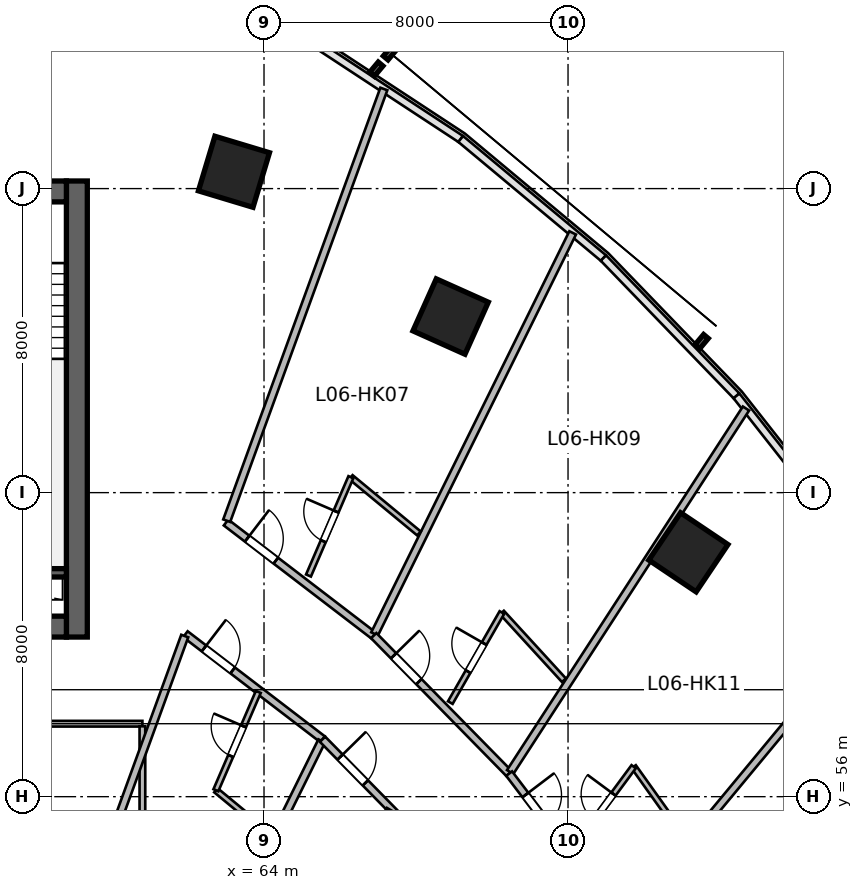
"""IFC4 building model, lengths in metres.
Left out: names, types, materials, properties, quantities, classifications, styles, units other than length and angle.
Written with IfcOpenShell. Run it as: python <this file> out.ifc"""

import sys

from ifc_helpers import new_model, si_unit, direction, frame, frame_2d, origin, origin_2d, place, context, subcontext, project, spatial, rectangle, extrude, source, transform, mapped, element, fill, save


model = new_model("IFC4")
c1 = context("Model", 3, precision=1e-05, world=origin(), true_north=direction((0.0, 1.0)))
c2 = subcontext(c1, "Body", "Model", "MODEL_VIEW")
j1 = project(units=[si_unit("LENGTHUNIT", "METRE"), si_unit("PLANEANGLEUNIT", "RADIAN")], contexts=[c1])
p1 = place(None, origin())
s1 = spatial("IfcSite", under=j1, at=p1, CompositionType="ELEMENT")
p2 = place(p1, origin())
s2 = spatial("IfcBuilding", under=s1, at=p2, CompositionType="ELEMENT")
p3 = place(p2, frame((0.0, 0.0, 35.4)))
s3 = spatial("IfcBuildingStorey", under=s2, at=p3, CompositionType="ELEMENT", Elevation=35.4)
m1 = source(origin(), c2, "Body", "SweptSolid", [
    extrude(rectangle(XDim=12.0, YDim=0.55, at=frame_2d((6.0, 0.0))), origin(), (0.0, 0.0, 1.0), 3.6),
])
p4 = place(p3, frame((59.075, 60.2, 0.0), z_axis=(0.0, 0.0, 1.0), x_axis=(0.0, 1.0, 0.0)))
e1 = element("IfcWall", 1, at=p4, inside=s3, PredefinedType="SHEAR", context=c2, shape_type="MappedRepresentation", body=[
    mapped(m1, transform((0.0, 0.0, 0.0), scale=1.0)),
])
m2 = source(origin(), c2, "Body", "SweptSolid", [
    extrude(rectangle(XDim=21.6, YDim=0.55, at=frame_2d((10.8, 0.0))), origin(), (0.0, 0.0, 1.0), 3.6),
])
p5 = place(p3, frame((37.2, 60.475, 0.0), z_axis=(0.0, 0.0, 1.0), x_axis=(1.0, 0.0, 0.0)))
e2 = element("IfcWall", 2, at=p5, inside=s3, PredefinedType="SHEAR", context=c2, shape_type="MappedRepresentation", body=[
    mapped(m2, transform((0.0, 0.0, 0.0), scale=1.0)),
])
p6 = place(p5, frame((1.1, 0.0, 0.0)))
e3 = element("IfcOpeningElement", 3, at=p6, cuts=e2, PredefinedType="OPENING", context=c2, shape_type="SweptSolid", body=[
    extrude(rectangle(XDim=1.15, YDim=2.15, at=frame_2d((0.575, 1.075))), frame((0.0, 0.285, 0.0), z_axis=(0.0, -1.0, 0.0), x_axis=(1.0, 0.0, 0.0)), (0.0, 0.0, 1.0), 0.57),
])
p7 = place(p5, frame((19.5, 0.0, 0.0)))
e4 = element("IfcOpeningElement", 4, at=p7, cuts=e2, PredefinedType="OPENING", context=c2, shape_type="SweptSolid", body=[
    extrude(rectangle(XDim=0.9, YDim=2.1, at=frame_2d((0.45, 1.05))), frame((0.0, 0.285, 0.0), z_axis=(0.0, -1.0, 0.0), x_axis=(1.0, 0.0, 0.0)), (0.0, 0.0, 1.0), 0.57),
])
p8 = place(p5, frame((12.02, 0.0, 0.0)))
e5 = element("IfcOpeningElement", 5, at=p8, cuts=e2, PredefinedType="OPENING", context=c2, shape_type="SweptSolid", body=[
    extrude(rectangle(XDim=1.6, YDim=2.15, at=frame_2d((0.8, 1.075))), frame((0.0, 0.285, 0.0), z_axis=(0.0, -1.0, 0.0), x_axis=(1.0, 0.0, 0.0)), (0.0, 0.0, 1.0), 0.57),
])
p9 = place(p3, frame((37.2, 71.925, 0.0), z_axis=(0.0, 0.0, 1.0), x_axis=(1.0, 0.0, 0.0)))
e6 = element("IfcWall", 6, at=p9, inside=s3, PredefinedType="SHEAR", context=c2, shape_type="MappedRepresentation", body=[
    mapped(m2, transform((0.0, 0.0, 0.0), scale=1.0)),
])
p10 = place(p9, frame((1.2, 0.0, 0.0)))
e7 = element("IfcOpeningElement", 7, at=p10, cuts=e6, PredefinedType="OPENING", context=c2, shape_type="SweptSolid", body=[
    extrude(rectangle(XDim=0.9, YDim=2.1, at=frame_2d((0.45, 1.05))), frame((0.0, 0.285, 0.0), z_axis=(0.0, -1.0, 0.0), x_axis=(1.0, 0.0, 0.0)), (0.0, 0.0, 1.0), 0.57),
])
p11 = place(p9, frame((14.7, 0.0, 0.0)))
e8 = element("IfcOpeningElement", 8, at=p11, cuts=e6, PredefinedType="OPENING", context=c2, shape_type="SweptSolid", body=[
    extrude(rectangle(XDim=1.2, YDim=2.15, at=frame_2d((0.6, 1.075))), frame((0.0, 0.285, 0.0), z_axis=(0.0, -1.0, 0.0), x_axis=(1.0, 0.0, 0.0)), (0.0, 0.0, 1.0), 0.57),
])
p12 = place(p9, frame((4.15, 0.0, 0.0)))
e9 = element("IfcOpeningElement", 9, at=p12, cuts=e6, PredefinedType="OPENING", context=c2, shape_type="SweptSolid", body=[
    extrude(rectangle(XDim=1.3, YDim=2.15, at=frame_2d((0.65, 1.075))), frame((0.0, 0.285, 0.0), z_axis=(0.0, -1.0, 0.0), x_axis=(1.0, 0.0, 0.0)), (0.0, 0.0, 1.0), 0.57),
])
p13 = place(p9, frame((7.1, 0.0, 0.0)))
e10 = element("IfcOpeningElement", 10, at=p13, cuts=e6, PredefinedType="OPENING", context=c2, shape_type="SweptSolid", body=[
    extrude(rectangle(XDim=0.9, YDim=2.1, at=frame_2d((0.45, 1.05))), frame((0.0, 0.285, 0.0), z_axis=(0.0, -1.0, 0.0), x_axis=(1.0, 0.0, 0.0)), (0.0, 0.0, 1.0), 0.57),
])
m3 = source(origin(), c2, "Body", "SweptSolid", [
    extrude(rectangle(XDim=3.27, YDim=0.22, at=frame_2d((1.635, 0.0))), origin(), (0.0, 0.0, 1.0), 3.6),
])
p14 = place(p3, frame((55.53, 61.89, 0.0), z_axis=(0.0, 0.0, 1.0), x_axis=(1.0, 0.0, 0.0)))
e11 = element("IfcWall", 11, at=p14, inside=s3, PredefinedType="SHEAR", context=c2, shape_type="MappedRepresentation", body=[
    mapped(m3, transform((0.0, 0.0, 0.0), scale=1.0)),
])
m4 = source(origin(), c2, "Body", "SweptSolid", [
    extrude(rectangle(XDim=1.5, YDim=1.5, at=origin_2d()), origin(), (0.0, 0.0, 1.0), 3.6),
])
for number, where, z_axis, x_axis in (
    (12, (63.209, 72.442, 0.0), (0.0, 0.0, 1.0), (0.289, 0.957, 0.0)),
    (13, (68.91, 68.633, 0.0), (0.0, 0.0, 1.0), (0.409, 0.912, 0.0)),
    (14, (75.167, 62.43, 0.0), (0.0, 0.0, 1.0), (0.558, 0.83, 0.0)),
):
    element("IfcColumn", number, at=place(p3, frame(where, z_axis=z_axis, x_axis=x_axis)), inside=s3, PredefinedType="COLUMN", context=c2, shape_type="MappedRepresentation", body=[
        mapped(m4, transform((0.0, 0.0, 0.0), scale=1.0)),
    ])
m5 = source(origin(), c2, "Body", "SweptSolid", [
    extrude(rectangle(XDim=6.6, YDim=0.15, at=frame_2d((3.3, 0.0))), origin(), (0.0, 0.0, 1.0), 3.36),
])
p15 = place(p3, frame((54.2, 57.92, 0.0), z_axis=(0.0, 0.0, 1.0), x_axis=(1.0, 0.0, 0.0)))
e15 = element("IfcWall", 15, at=p15, inside=s3, PredefinedType="PARTITIONING", context=c2, shape_type="MappedRepresentation", body=[
    mapped(m5, transform((0.0, 0.0, 0.0), scale=1.0)),
])
p16 = place(p15, frame((2.825, 0.0, 0.0)))
e16 = element("IfcOpeningElement", 16, at=p16, cuts=e15, PredefinedType="OPENING", context=c2, shape_type="SweptSolid", body=[
    extrude(rectangle(XDim=0.95, YDim=2.1, at=frame_2d((0.475, 1.05))), frame((0.0, 0.085, 0.0), z_axis=(0.0, -1.0, 0.0), x_axis=(1.0, 0.0, 0.0)), (0.0, 0.0, 1.0), 0.17),
])
m6 = source(origin(), c2, "Body", "SweptSolid", [
    extrude(rectangle(XDim=3.785, YDim=0.15, at=frame_2d((1.893, 0.0))), origin(), (0.0, 0.0, 1.0), 3.36),
])
p17 = place(p3, frame((60.8, 54.067, 0.0), z_axis=(0.0, 0.0, 1.0), x_axis=(0.0, 1.0, 0.0)))
e17 = element("IfcWall", 17, at=p17, inside=s3, PredefinedType="PARTITIONING", context=c2, shape_type="MappedRepresentation", body=[
    mapped(m6, transform((0.0, 0.0, 0.0), scale=1.0)),
])
m7 = source(origin(), c2, "Body", "SweptSolid", [
    extrude(rectangle(XDim=4.895, YDim=0.195, at=frame_2d((2.447, 0.0))), origin(), (0.0, 0.0, 1.0), 3.36),
])
p18 = place(p3, frame((63.001, 63.214, 0.0), z_axis=(0.0, 0.0, 1.0), x_axis=(0.793896075849, -0.608053468661, 0.0)))
e18 = element("IfcWall", 18, at=p18, inside=s3, PredefinedType="PARTITIONING", context=c2, shape_type="MappedRepresentation", body=[
    mapped(m7, transform((0.0, 0.0, 0.0), scale=1.0)),
])
p19 = place(p18, frame((0.7, 0.0, 0.0)))
e19 = element("IfcOpeningElement", 19, at=p19, cuts=e18, PredefinedType="OPENING", context=c2, shape_type="SweptSolid", body=[
    extrude(rectangle(XDim=0.95, YDim=2.15, at=frame_2d((0.475, 1.075))), frame((0.0, 0.107, 0.0), z_axis=(0.0, -1.0, 0.0), x_axis=(1.0, 0.0, 0.0)), (0.0, 0.0, 1.0), 0.215),
])
m8 = source(origin(), c2, "Body", "SweptSolid", [
    extrude(rectangle(XDim=12.088, YDim=0.195, at=frame_2d((6.044, 0.0))), origin(), (0.0, 0.0, 1.0), 3.36),
])
p20 = place(p3, frame((63.019, 63.262, 0.0), z_axis=(0.0, 0.0, 1.0), x_axis=(0.34203007529, 0.939689005787, 0.0)))
e20 = element("IfcWall", 20, at=p20, inside=s3, PredefinedType="PARTITIONING", context=c2, shape_type="MappedRepresentation", body=[
    mapped(m8, transform((0.0, 0.0, 0.0), scale=1.0)),
])
m9 = source(origin(), c2, "Body", "SweptSolid", [
    extrude(rectangle(XDim=11.77, YDim=0.195, at=frame_2d((5.885, 0.0))), origin(), (0.0, 0.0, 1.0), 3.36),
])
p21 = place(p3, frame((66.909, 60.282, 0.0), z_axis=(0.0, 0.0, 1.0), x_axis=(0.44286060326, 0.896590478468, 0.0)))
e21 = element("IfcWall", 21, at=p21, inside=s3, PredefinedType="PARTITIONING", context=c2, shape_type="MappedRepresentation", body=[
    mapped(m9, transform((0.0, 0.0, 0.0), scale=1.0)),
])
m10 = source(origin(), c2, "Body", "SweptSolid", [
    extrude(rectangle(XDim=2.324, YDim=0.14, at=frame_2d((1.162, 0.0))), origin(), (0.0, 0.0, 1.0), 3.36),
])
p22 = place(p3, frame((66.286, 64.407, 0.0), z_axis=(0.0, 0.0, 1.0), x_axis=(0.770746444956, -0.637141991701, 0.0)))
e22 = element("IfcWall", 22, at=p22, inside=s3, PredefinedType="PARTITIONING", context=c2, shape_type="MappedRepresentation", body=[
    mapped(m10, transform((0.0, 0.0, 0.0), scale=1.0)),
])
m11 = source(origin(), c2, "Body", "SweptSolid", [
    extrude(rectangle(XDim=2.818, YDim=0.14, at=frame_2d((1.409, 0.0))), origin(), (0.0, 0.0, 1.0), 3.36),
])
p23 = place(p3, frame((65.17, 61.819, 0.0), z_axis=(0.0, 0.0, 1.0), x_axis=(0.395894859341, 0.918295845764, 0.0)))
e23 = element("IfcWall", 23, at=p23, inside=s3, PredefinedType="PARTITIONING", context=c2, shape_type="MappedRepresentation", body=[
    mapped(m11, transform((0.0, 0.0, 0.0), scale=1.0)),
])
p24 = place(p23, frame((0.984, 0.0, 0.0)))
e24 = element("IfcOpeningElement", 24, at=p24, cuts=e23, PredefinedType="OPENING", context=c2, shape_type="SweptSolid", body=[
    extrude(rectangle(XDim=0.85, YDim=2.05, at=frame_2d((0.425, 1.025))), frame((0.0, 0.08, 0.0), z_axis=(0.0, -1.0, 0.0), x_axis=(1.0, 0.0, 0.0)), (0.0, 0.0, 1.0), 0.16),
])
m12 = source(origin(), c2, "Body", "SweptSolid", [
    extrude(rectangle(XDim=4.546, YDim=0.195, at=frame_2d((2.273, 0.0))), origin(), (0.0, 0.0, 1.0), 3.36),
])
p25 = place(p3, frame((61.931, 60.275, 0.0), z_axis=(0.0, 0.0, 1.0), x_axis=(0.793907931297, -0.608037989457, 0.0)))
e25 = element("IfcWall", 25, at=p25, inside=s3, PredefinedType="PARTITIONING", context=c2, shape_type="MappedRepresentation", body=[
    mapped(m12, transform((0.0, 0.0, 0.0), scale=1.0)),
])
p26 = place(p25, frame((0.616, 0.0, 0.0)))
e26 = element("IfcOpeningElement", 26, at=p26, cuts=e25, PredefinedType="OPENING", context=c2, shape_type="SweptSolid", body=[
    extrude(rectangle(XDim=0.95, YDim=2.15, at=frame_2d((0.475, 1.075))), frame((0.0, 0.107, 0.0), z_axis=(0.0, -1.0, 0.0), x_axis=(1.0, 0.0, 0.0)), (0.0, 0.0, 1.0), 0.215),
])
m13 = source(origin(), c2, "Body", "SweptSolid", [
    extrude(rectangle(XDim=12.196, YDim=0.195, at=frame_2d((6.098, 0.0))), origin(), (0.0, 0.0, 1.0), 3.36),
])
p27 = place(p3, frame((57.742, 48.766, 0.0), z_axis=(0.0, 0.0, 1.0), x_axis=(0.342022711534, 0.939691686031, 0.0)))
e27 = element("IfcWall", 27, at=p27, inside=s3, PredefinedType="PARTITIONING", context=c2, shape_type="MappedRepresentation", body=[
    mapped(m13, transform((0.0, 0.0, 0.0), scale=1.0)),
])
m14 = source(origin(), c2, "Body", "SweptSolid", [
    extrude(rectangle(XDim=11.844, YDim=0.195, at=frame_2d((5.922, 0.0))), origin(), (0.0, 0.0, 1.0), 3.36),
])
p28 = place(p3, frame((60.273, 46.848, 0.0), z_axis=(0.0, 0.0, 1.0), x_axis=(0.442871152218, 0.896585267854, 0.0)))
e28 = element("IfcWall", 28, at=p28, inside=s3, PredefinedType="PARTITIONING", context=c2, shape_type="MappedRepresentation", body=[
    mapped(m14, transform((0.0, 0.0, 0.0), scale=1.0)),
])
m15 = source(origin(), c2, "Body", "SweptSolid", [
    extrude(rectangle(XDim=1.873, YDim=0.14, at=frame_2d((0.937, 0.0))), origin(), (0.0, 0.0, 1.0), 3.36),
])
p29 = place(p3, frame((62.734, 56.169, 0.0), z_axis=(0.0, 0.0, 1.0), x_axis=(0.77069451688, -0.637204803537, 0.0)))
e29 = element("IfcWall", 29, at=p29, inside=s3, PredefinedType="PARTITIONING", context=c2, shape_type="MappedRepresentation", body=[
    mapped(m15, transform((0.0, 0.0, 0.0), scale=1.0)),
])
m16 = source(origin(), c2, "Body", "SweptSolid", [
    extrude(rectangle(XDim=2.817, YDim=0.14, at=frame_2d((1.409, 0.0))), origin(), (0.0, 0.0, 1.0), 3.36),
])
p30 = place(p3, frame((62.734, 56.169, 0.0), z_axis=(0.0, 0.0, 1.0), x_axis=(0.395999429727, 0.918250756415, 0.0)))
e30 = element("IfcWall", 30, at=p30, inside=s3, PredefinedType="PARTITIONING", context=c2, shape_type="MappedRepresentation", body=[
    mapped(m16, transform((0.0, 0.0, 0.0), scale=1.0)),
])
p31 = place(p30, frame((0.984, 0.0, 0.0)))
e31 = element("IfcOpeningElement", 31, at=p31, cuts=e30, PredefinedType="OPENING", context=c2, shape_type="SweptSolid", body=[
    extrude(rectangle(XDim=0.85, YDim=2.05, at=frame_2d((0.425, 1.025))), frame((0.0, 0.08, 0.0), z_axis=(0.0, -1.0, 0.0), x_axis=(1.0, 0.0, 0.0)), (0.0, 0.0, 1.0), 0.16),
])
m17 = source(origin(), c2, "Body", "SweptSolid", [
    extrude(rectangle(XDim=5.087, YDim=0.195, at=frame_2d((2.543, 0.0))), origin(), (0.0, 0.0, 1.0), 3.36),
])
p32 = place(p3, frame((66.887, 60.238, 0.0), z_axis=(0.0, 0.0, 1.0), x_axis=(0.700428330775, -0.7137227427, 0.0)))
e32 = element("IfcWall", 32, at=p32, inside=s3, PredefinedType="PARTITIONING", context=c2, shape_type="MappedRepresentation", body=[
    mapped(m17, transform((0.0, 0.0, 0.0), scale=1.0)),
])
p33 = place(p32, frame((0.746, 0.0, 0.0)))
e33 = element("IfcOpeningElement", 33, at=p33, cuts=e32, PredefinedType="OPENING", context=c2, shape_type="SweptSolid", body=[
    extrude(rectangle(XDim=0.95, YDim=2.15, at=frame_2d((0.475, 1.075))), frame((0.0, 0.107, 0.0), z_axis=(0.0, -1.0, 0.0), x_axis=(1.0, 0.0, 0.0)), (0.0, 0.0, 1.0), 0.215),
])
m18 = source(origin(), c2, "Body", "SweptSolid", [
    extrude(rectangle(XDim=11.403, YDim=0.195, at=frame_2d((5.701, 0.0))), origin(), (0.0, 0.0, 1.0), 3.36),
])
p34 = place(p3, frame((70.477, 56.647, 0.0), z_axis=(0.0, 0.0, 1.0), x_axis=(0.544246090008, 0.838925618581, 0.0)))
e34 = element("IfcWall", 34, at=p34, inside=s3, PredefinedType="PARTITIONING", context=c2, shape_type="MappedRepresentation", body=[
    mapped(m18, transform((0.0, 0.0, 0.0), scale=1.0)),
])
m19 = source(origin(), c2, "Body", "SweptSolid", [
    extrude(rectangle(XDim=2.416, YDim=0.14, at=frame_2d((1.208, 0.0))), origin(), (0.0, 0.0, 1.0), 3.36),
])
p35 = place(p3, frame((70.26, 60.846, 0.0), z_axis=(0.0, 0.0, 1.0), x_axis=(0.675399637907, -0.737451916476, 0.0)))
e35 = element("IfcWall", 35, at=p35, inside=s3, PredefinedType="PARTITIONING", context=c2, shape_type="MappedRepresentation", body=[
    mapped(m19, transform((0.0, 0.0, 0.0), scale=1.0)),
])
m20 = source(origin(), c2, "Body", "SweptSolid", [
    extrude(rectangle(XDim=2.732, YDim=0.14, at=frame_2d((1.366, 0.0))), origin(), (0.0, 0.0, 1.0), 3.36),
])
p36 = place(p3, frame((68.902, 58.476, 0.0), z_axis=(0.0, 0.0, 1.0), x_axis=(0.497254966372, 0.867604459658, 0.0)))
e36 = element("IfcWall", 36, at=p36, inside=s3, PredefinedType="PARTITIONING", context=c2, shape_type="MappedRepresentation", body=[
    mapped(m20, transform((0.0, 0.0, 0.0), scale=1.0)),
])
p37 = place(p36, frame((0.941, 0.0, 0.0)))
e37 = element("IfcOpeningElement", 37, at=p37, cuts=e36, PredefinedType="OPENING", context=c2, shape_type="SweptSolid", body=[
    extrude(rectangle(XDim=0.85, YDim=2.05, at=frame_2d((0.425, 1.025))), frame((0.0, 0.08, 0.0), z_axis=(0.0, -1.0, 0.0), x_axis=(1.0, 0.0, 0.0)), (0.0, 0.0, 1.0), 0.16),
])
m21 = source(origin(), c2, "Body", "SweptSolid", [
    extrude(rectangle(XDim=4.724, YDim=0.195, at=frame_2d((2.362, 0.0))), origin(), (0.0, 0.0, 1.0), 3.36),
])
p38 = place(p3, frame((65.541, 57.511, 0.0), z_axis=(0.0, 0.0, 1.0), x_axis=(0.700435057457, -0.713716141253, 0.0)))
e38 = element("IfcWall", 38, at=p38, inside=s3, PredefinedType="PARTITIONING", context=c2, shape_type="MappedRepresentation", body=[
    mapped(m21, transform((0.0, 0.0, 0.0), scale=1.0)),
])
p39 = place(p38, frame((0.659, 0.0, 0.0)))
e39 = element("IfcOpeningElement", 39, at=p39, cuts=e38, PredefinedType="OPENING", context=c2, shape_type="SweptSolid", body=[
    extrude(rectangle(XDim=0.95, YDim=2.15, at=frame_2d((0.475, 1.075))), frame((0.0, 0.107, 0.0), z_axis=(0.0, -1.0, 0.0), x_axis=(1.0, 0.0, 0.0)), (0.0, 0.0, 1.0), 0.215),
])
m22 = source(origin(), c2, "Body", "SweptSolid", [
    extrude(rectangle(XDim=2.731, YDim=0.14, at=frame_2d((1.366, 0.0))), origin(), (0.0, 0.0, 1.0), 3.36),
])
p40 = place(p3, frame((65.936, 53.3, 0.0), z_axis=(0.0, 0.0, 1.0), x_axis=(0.497120404056, 0.867681568244, 0.0)))
e40 = element("IfcWall", 40, at=p40, inside=s3, PredefinedType="PARTITIONING", context=c2, shape_type="MappedRepresentation", body=[
    mapped(m22, transform((0.0, 0.0, 0.0), scale=1.0)),
])
p41 = place(p40, frame((0.941, 0.0, 0.0)))
e41 = element("IfcOpeningElement", 41, at=p41, cuts=e40, PredefinedType="OPENING", context=c2, shape_type="SweptSolid", body=[
    extrude(rectangle(XDim=0.85, YDim=2.05, at=frame_2d((0.425, 1.025))), frame((0.0, 0.08, 0.0), z_axis=(0.0, -1.0, 0.0), x_axis=(1.0, 0.0, 0.0)), (0.0, 0.0, 1.0), 0.16),
])
m23 = source(origin(), c2, "Body", "SweptSolid", [
    extrude(rectangle(XDim=4.928, YDim=0.195, at=frame_2d((2.464, 0.0))), origin(), (0.0, 0.0, 1.0), 3.36),
])
p42 = place(p3, frame((70.45, 56.607, 0.0), z_axis=(0.0, 0.0, 1.0), x_axis=(0.604793043708, -0.796382680803, 0.0)))
e42 = element("IfcWall", 42, at=p42, inside=s3, PredefinedType="PARTITIONING", context=c2, shape_type="MappedRepresentation", body=[
    mapped(m23, transform((0.0, 0.0, 0.0), scale=1.0)),
])
p43 = place(p42, frame((0.708, 0.0, 0.0)))
e43 = element("IfcOpeningElement", 43, at=p43, cuts=e42, PredefinedType="OPENING", context=c2, shape_type="SweptSolid", body=[
    extrude(rectangle(XDim=0.95, YDim=2.15, at=frame_2d((0.475, 1.075))), frame((0.0, 0.107, 0.0), z_axis=(0.0, -1.0, 0.0), x_axis=(1.0, 0.0, 0.0)), (0.0, 0.0, 1.0), 0.215),
])
m24 = source(origin(), c2, "Body", "SweptSolid", [
    extrude(rectangle(XDim=10.975, YDim=0.195, at=frame_2d((5.487, 0.0))), origin(), (0.0, 0.0, 1.0), 3.36),
])
p44 = place(p3, frame((73.46, 52.719, 0.0), z_axis=(0.0, 0.0, 1.0), x_axis=(0.638125265812, 0.769932558821, 0.0)))
e44 = element("IfcWall", 44, at=p44, inside=s3, PredefinedType="PARTITIONING", context=c2, shape_type="MappedRepresentation", body=[
    mapped(m24, transform((0.0, 0.0, 0.0), scale=1.0)),
])
m25 = source(origin(), c2, "Body", "SweptSolid", [
    extrude(rectangle(XDim=2.337, YDim=0.14, at=frame_2d((1.169, 0.0))), origin(), (0.0, 0.0, 1.0), 3.36),
])
p45 = place(p3, frame((73.727, 56.789, 0.0), z_axis=(0.0, 0.0, 1.0), x_axis=(0.580862665959, -0.814001574504, 0.0)))
e45 = element("IfcWall", 45, at=p45, inside=s3, PredefinedType="PARTITIONING", context=c2, shape_type="MappedRepresentation", body=[
    mapped(m25, transform((0.0, 0.0, 0.0), scale=1.0)),
])
m26 = source(origin(), c2, "Body", "SweptSolid", [
    extrude(rectangle(XDim=2.64, YDim=0.14, at=frame_2d((1.32, 0.0))), origin(), (0.0, 0.0, 1.0), 3.36),
])
p46 = place(p3, frame((72.157, 54.666, 0.0), z_axis=(0.0, 0.0, 1.0), x_axis=(0.594630255283, 0.803999290735, 0.0)))
e46 = element("IfcWall", 46, at=p46, inside=s3, PredefinedType="PARTITIONING", context=c2, shape_type="MappedRepresentation", body=[
    mapped(m26, transform((0.0, 0.0, 0.0), scale=1.0)),
])
p47 = place(p46, frame((0.895, 0.0, 0.0)))
e47 = element("IfcOpeningElement", 47, at=p47, cuts=e46, PredefinedType="OPENING", context=c2, shape_type="SweptSolid", body=[
    extrude(rectangle(XDim=0.85, YDim=2.05, at=frame_2d((0.425, 1.025))), frame((0.0, 0.08, 0.0), z_axis=(0.0, -1.0, 0.0), x_axis=(1.0, 0.0, 0.0)), (0.0, 0.0, 1.0), 0.16),
])
m27 = source(origin(), c2, "Body", "SweptSolid", [
    extrude(rectangle(XDim=0.95, YDim=2.15, at=frame_2d((0.475, 1.075))), frame((0.0, 0.025, 0.0), z_axis=(0.0, -1.0, 0.0), x_axis=(1.0, 0.0, 0.0)), (0.0, 0.0, 1.0), 0.05),
])
p48 = place(p19, origin())
e48 = element("IfcDoor", 48, at=p48, inside=s3, OperationType="SINGLE_SWING_LEFT", PredefinedType="DOOR", context=c2, shape_type="MappedRepresentation", body=[
    mapped(m27, transform((0.0, 0.0, 0.0), scale=1.0)),
])
fill(e19, e48)
m28 = source(origin(), c2, "Body", "SweptSolid", [
    extrude(rectangle(XDim=0.85, YDim=2.05, at=frame_2d((0.425, 1.025))), frame((0.0, 0.025, 0.0), z_axis=(0.0, -1.0, 0.0), x_axis=(1.0, 0.0, 0.0)), (0.0, 0.0, 1.0), 0.05),
])
p49 = place(p24, origin())
e49 = element("IfcDoor", 49, at=p49, inside=s3, OperationType="SINGLE_SWING_RIGHT", PredefinedType="DOOR", context=c2, shape_type="MappedRepresentation", body=[
    mapped(m28, transform((0.0, 0.0, 0.0), scale=1.0)),
])
fill(e24, e49)
p50 = place(p26, origin())
e50 = element("IfcDoor", 50, at=p50, inside=s3, OperationType="SINGLE_SWING_LEFT", PredefinedType="DOOR", context=c2, shape_type="MappedRepresentation", body=[
    mapped(m27, transform((0.0, 0.0, 0.0), scale=1.0)),
])
fill(e26, e50)
p51 = place(p31, origin())
e51 = element("IfcDoor", 51, at=p51, inside=s3, OperationType="SINGLE_SWING_RIGHT", PredefinedType="DOOR", context=c2, shape_type="MappedRepresentation", body=[
    mapped(m28, transform((0.0, 0.0, 0.0), scale=1.0)),
])
fill(e31, e51)
p52 = place(p33, origin())
e52 = element("IfcDoor", 52, at=p52, inside=s3, OperationType="SINGLE_SWING_LEFT", PredefinedType="DOOR", context=c2, shape_type="MappedRepresentation", body=[
    mapped(m27, transform((0.0, 0.0, 0.0), scale=1.0)),
])
fill(e33, e52)
p53 = place(p37, origin())
e53 = element("IfcDoor", 53, at=p53, inside=s3, OperationType="SINGLE_SWING_RIGHT", PredefinedType="DOOR", context=c2, shape_type="MappedRepresentation", body=[
    mapped(m28, transform((0.0, 0.0, 0.0), scale=1.0)),
])
fill(e37, e53)
p54 = place(p39, origin())
e54 = element("IfcDoor", 54, at=p54, inside=s3, OperationType="SINGLE_SWING_LEFT", PredefinedType="DOOR", context=c2, shape_type="MappedRepresentation", body=[
    mapped(m27, transform((0.0, 0.0, 0.0), scale=1.0)),
])
fill(e39, e54)
p55 = place(p43, origin())
e55 = element("IfcDoor", 55, at=p55, inside=s3, OperationType="SINGLE_SWING_LEFT", PredefinedType="DOOR", context=c2, shape_type="MappedRepresentation", body=[
    mapped(m27, transform((0.0, 0.0, 0.0), scale=1.0)),
])
fill(e43, e55)
p56 = place(p47, origin())
e56 = element("IfcDoor", 56, at=p56, inside=s3, OperationType="SINGLE_SWING_RIGHT", PredefinedType="DOOR", context=c2, shape_type="MappedRepresentation", body=[
    mapped(m28, transform((0.0, 0.0, 0.0), scale=1.0)),
])
fill(e47, e56)
save(model, sys.argv[1])
